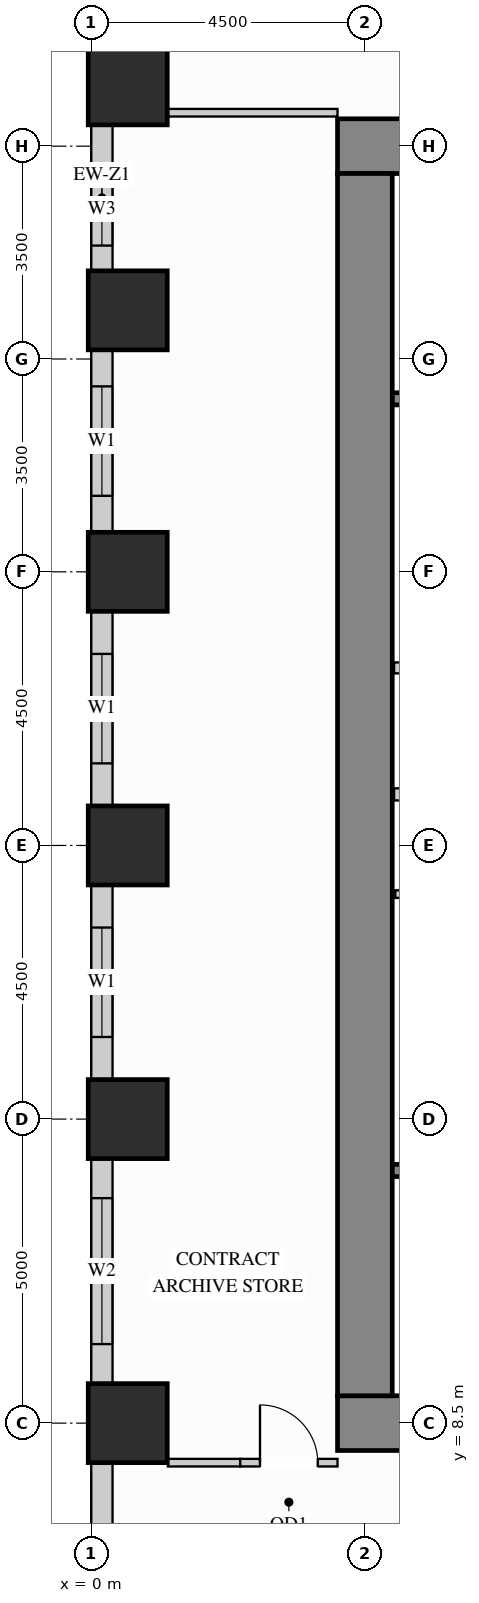
"""IFC4 building model, lengths in metres.
Left out: names, types, materials, properties, quantities, classifications, styles, units other than length and angle.
Written with IfcOpenShell. Run it as: python <this file> out.ifc"""

import sys

from ifc_helpers import new_model, si_unit, direction, frame, frame_2d, origin, origin_2d, place, context, subcontext, project, spatial, rectangle, extrude, source, transform, mapped, element, fill, save


model = new_model("IFC4")
c1 = context("Model", 3, precision=1e-05, world=origin(), true_north=direction((0.0, 1.0)))
c2 = subcontext(c1, "Body", "Model", "MODEL_VIEW")
j1 = project(units=[si_unit("LENGTHUNIT", "METRE"), si_unit("PLANEANGLEUNIT", "RADIAN")], contexts=[c1])
p1 = place(None, origin())
s1 = spatial("IfcSite", under=j1, at=p1, CompositionType="ELEMENT")
p2 = place(p1, origin())
s2 = spatial("IfcBuilding", under=s1, at=p2, CompositionType="ELEMENT")
p3 = place(p2, frame((0.0, 0.0, 40.5)))
s3 = spatial("IfcBuildingStorey", under=s2, at=p3, CompositionType="ELEMENT", Elevation=40.5)
m1 = source(origin(), c2, "Body", "SweptSolid", [
    extrude(rectangle(XDim=1.3, YDim=1.3, at=origin_2d()), origin(), (0.0, 0.0, 1.0), 3.38),
])
for number, where, z_axis, x_axis in (
    (1, (0.6, 13.5, 0.0), (0.0, 0.0, 1.0), (1.0, 0.0, 0.0)),
    (2, (0.6, 18.0, 0.0), (0.0, 0.0, 1.0), (1.0, 0.0, 0.0)),
    (3, (0.6, 22.5, 0.0), (0.0, 0.0, 1.0), (1.0, 0.0, 0.0)),
    (4, (0.6, 26.8, 0.0), (0.0, 0.0, 1.0), (1.0, 0.0, 0.0)),
    (5, (0.6, 30.5, 0.0), (0.0, 0.0, 1.0), (1.0, 0.0, 0.0)),
    (6, (0.6, 8.5, 0.0), (0.0, 0.0, 1.0), (1.0, 0.0, 0.0)),
):
    element("IfcColumn", number, at=place(p3, frame(where, z_axis=z_axis, x_axis=x_axis)), inside=s3, PredefinedType="COLUMN", context=c2, shape_type="MappedRepresentation", body=[
        mapped(m1, transform((0.0, 0.0, 0.0), x_axis=(1.0, 0.0, 0.0), y_axis=(0.0, 1.0, 0.0), z_axis=(0.0, 0.0, 1.0))),
    ])
m2 = source(origin(), c2, "Body", "SweptSolid", [
    extrude(rectangle(XDim=10.9, YDim=0.9, at=frame_2d((5.45, 0.0))), origin(), (0.0, 0.0, 1.0), 3.38),
])
for number, where, z_axis, x_axis in (
    (7, (4.05, 29.5, 0.0), (0.0, 0.0, 1.0), (1.0, 0.0, 0.0)),
    (8, (4.05, 8.5, 0.0), (0.0, 0.0, 1.0), (1.0, 0.0, 0.0)),
):
    element("IfcWall", number, at=place(p3, frame(where, z_axis=z_axis, x_axis=x_axis)), inside=s3, PredefinedType="SHEAR", context=c2, shape_type="MappedRepresentation", body=[
        mapped(m2, transform((0.0, 0.0, 0.0), x_axis=(1.0, 0.0, 0.0), y_axis=(0.0, 1.0, 0.0), z_axis=(0.0, 0.0, 1.0))),
    ])
m3 = source(origin(), c2, "Body", "SweptSolid", [
    extrude(rectangle(XDim=20.1, YDim=0.9, at=frame_2d((10.05, 0.0))), origin(), (0.0, 0.0, 1.0), 3.38),
])
p4 = place(p3, frame((4.5, 8.95, 0.0), z_axis=(0.0, 0.0, 1.0), x_axis=(0.0, 1.0, 0.0)))
e9 = element("IfcWall", 9, at=p4, inside=s3, PredefinedType="SHEAR", context=c2, shape_type="MappedRepresentation", body=[
    mapped(m3, transform((0.0, 0.0, 0.0), x_axis=(1.0, 0.0, 0.0), y_axis=(0.0, 1.0, 0.0), z_axis=(0.0, 0.0, 1.0))),
])
p5 = place(p3, frame((0.175, 29.852, 0.0), z_axis=(0.0, 0.0, 1.0), x_axis=(0.0, -1.0, 0.0)))
e10 = element("IfcWall", 10, at=p5, inside=s3, PredefinedType="SOLIDWALL", context=c2, shape_type="SweptSolid", body=[
    extrude(rectangle(XDim=2.404, YDim=0.35, at=frame_2d((1.202, 0.0))), origin(), (0.0, 0.0, 1.0), 2.51),
])
p6 = place(p5, frame((0.787, 0.0, 0.78)))
e11 = element("IfcOpeningElement", 11, at=p6, cuts=e10, PredefinedType="OPENING", context=c2, shape_type="SweptSolid", body=[
    extrude(rectangle(XDim=1.2, YDim=1.55, at=frame_2d((0.6, 0.775))), frame((0.0, 0.185, 0.0), z_axis=(0.0, -1.0, 0.0), x_axis=(1.0, 0.0, 0.0)), (0.0, 0.0, 1.0), 0.37),
])
p7 = place(p3, frame((0.175, 26.152, 0.0), z_axis=(0.0, 0.0, 1.0), x_axis=(0.0, -1.0, 0.0)))
e12 = element("IfcWall", 12, at=p7, inside=s3, PredefinedType="SOLIDWALL", context=c2, shape_type="SweptSolid", body=[
    extrude(rectangle(XDim=3.004, YDim=0.35, at=frame_2d((1.502, 0.0))), origin(), (0.0, 0.0, 1.0), 2.51),
])
p8 = place(p7, frame((0.602, 0.0, 0.78)))
e13 = element("IfcOpeningElement", 13, at=p8, cuts=e12, PredefinedType="OPENING", context=c2, shape_type="SweptSolid", body=[
    extrude(rectangle(XDim=1.8, YDim=1.55, at=frame_2d((0.9, 0.775))), frame((0.0, 0.185, 0.0), z_axis=(0.0, -1.0, 0.0), x_axis=(1.0, 0.0, 0.0)), (0.0, 0.0, 1.0), 0.37),
])
p9 = place(p3, frame((0.175, 21.852, 0.0), z_axis=(0.0, 0.0, 1.0), x_axis=(0.0, -1.0, 0.0)))
e14 = element("IfcWall", 14, at=p9, inside=s3, PredefinedType="SOLIDWALL", context=c2, shape_type="SweptSolid", body=[
    extrude(rectangle(XDim=3.204, YDim=0.35, at=frame_2d((1.602, 0.0))), origin(), (0.0, 0.0, 1.0), 2.51),
])
p10 = place(p9, frame((0.702, 0.0, 0.78)))
e15 = element("IfcOpeningElement", 15, at=p10, cuts=e14, PredefinedType="OPENING", context=c2, shape_type="SweptSolid", body=[
    extrude(rectangle(XDim=1.8, YDim=1.55, at=frame_2d((0.9, 0.775))), frame((0.0, 0.185, 0.0), z_axis=(0.0, -1.0, 0.0), x_axis=(1.0, 0.0, 0.0)), (0.0, 0.0, 1.0), 0.37),
])
p11 = place(p3, frame((0.175, 17.352, 0.0), z_axis=(0.0, 0.0, 1.0), x_axis=(0.0, -1.0, 0.0)))
e16 = element("IfcWall", 16, at=p11, inside=s3, PredefinedType="SOLIDWALL", context=c2, shape_type="SweptSolid", body=[
    extrude(rectangle(XDim=3.204, YDim=0.35, at=frame_2d((1.602, 0.0))), origin(), (0.0, 0.0, 1.0), 2.51),
])
p12 = place(p11, frame((0.702, 0.0, 0.78)))
e17 = element("IfcOpeningElement", 17, at=p12, cuts=e16, PredefinedType="OPENING", context=c2, shape_type="SweptSolid", body=[
    extrude(rectangle(XDim=1.8, YDim=1.55, at=frame_2d((0.9, 0.775))), frame((0.0, 0.185, 0.0), z_axis=(0.0, -1.0, 0.0), x_axis=(1.0, 0.0, 0.0)), (0.0, 0.0, 1.0), 0.37),
])
p13 = place(p3, frame((0.175, 12.852, 0.0), z_axis=(0.0, 0.0, 1.0), x_axis=(0.0, -1.0, 0.0)))
e18 = element("IfcWall", 18, at=p13, inside=s3, PredefinedType="SOLIDWALL", context=c2, shape_type="SweptSolid", body=[
    extrude(rectangle(XDim=3.704, YDim=0.35, at=frame_2d((1.852, 0.0))), origin(), (0.0, 0.0, 1.0), 2.51),
])
p14 = place(p13, frame((0.652, 0.0, 0.78)))
e19 = element("IfcOpeningElement", 19, at=p14, cuts=e18, PredefinedType="OPENING", context=c2, shape_type="SweptSolid", body=[
    extrude(rectangle(XDim=2.4, YDim=1.55, at=frame_2d((1.2, 0.775))), frame((0.0, 0.185, 0.0), z_axis=(0.0, -1.0, 0.0), x_axis=(1.0, 0.0, 0.0)), (0.0, 0.0, 1.0), 0.37),
])
p15 = place(p3, frame((0.175, 7.852, 0.0), z_axis=(0.0, 0.0, 1.0), x_axis=(0.0, -1.0, 0.0)))
e20 = element("IfcWall", 20, at=p15, inside=s3, PredefinedType="SOLIDWALL", context=c2, shape_type="SweptSolid", body=[
    extrude(rectangle(XDim=3.704, YDim=0.35, at=frame_2d((1.852, 0.0))), origin(), (0.0, 0.0, 1.0), 2.51),
])
p16 = place(p15, frame((2.068, 0.0, 0.78)))
e21 = element("IfcOpeningElement", 21, at=p16, cuts=e20, PredefinedType="OPENING", context=c2, shape_type="SweptSolid", body=[
    extrude(rectangle(XDim=1.2, YDim=1.55, at=frame_2d((0.6, 0.775))), frame((0.0, 0.185, 0.0), z_axis=(0.0, -1.0, 0.0), x_axis=(1.0, 0.0, 0.0)), (0.0, 0.0, 1.0), 0.37),
])
m4 = source(origin(), c2, "Body", "SweptSolid", [
    extrude(rectangle(XDim=2.17, YDim=0.18, at=frame_2d((1.085, 0.0))), origin(), (0.0, 0.0, 1.0), 3.365),
])
p17 = place(p3, frame((4.98, 20.92, 0.0), z_axis=(0.0, 0.0, 1.0), x_axis=(1.0, 0.0, 0.0)))
e22 = element("IfcWall", 22, at=p17, inside=s3, PredefinedType="PARTITIONING", context=c2, shape_type="MappedRepresentation", body=[
    mapped(m4, transform((0.0, 0.0, 0.0), x_axis=(1.0, 0.0, 0.0), y_axis=(0.0, 1.0, 0.0), z_axis=(0.0, 0.0, 1.0))),
])
p18 = place(p3, frame((5.0, 17.2, 0.0), z_axis=(0.0, 0.0, 1.0), x_axis=(1.0, 0.0, 0.0)))
e23 = element("IfcWall", 23, at=p18, inside=s3, PredefinedType="PARTITIONING", context=c2, shape_type="SweptSolid", body=[
    extrude(rectangle(XDim=2.4, YDim=0.125, at=frame_2d((1.2, 0.0))), origin(), (0.0, 0.0, 1.0), 3.365),
])
p19 = place(p18, frame((0.7, 0.0, 0.0)))
e24 = element("IfcOpeningElement", 24, at=p19, cuts=e23, PredefinedType="OPENING", context=c2, shape_type="SweptSolid", body=[
    extrude(rectangle(XDim=0.85, YDim=2.1, at=frame_2d((0.425, 1.05))), frame((0.0, 0.073, 0.0), z_axis=(0.0, -1.0, 0.0), x_axis=(1.0, 0.0, 0.0)), (0.0, 0.0, 1.0), 0.145),
])
m5 = source(origin(), c2, "Body", "SweptSolid", [
    extrude(rectangle(XDim=2.79, YDim=0.125, at=frame_2d((1.395, 0.0))), origin(), (0.0, 0.0, 1.0), 3.365),
])
p20 = place(p3, frame((1.26, 30.05, 0.0), z_axis=(0.0, 0.0, 1.0), x_axis=(1.0, 0.0, 0.0)))
e25 = element("IfcWall", 25, at=p20, inside=s3, PredefinedType="PARTITIONING", context=c2, shape_type="MappedRepresentation", body=[
    mapped(m5, transform((0.0, 0.0, 0.0), x_axis=(1.0, 0.0, 0.0), y_axis=(0.0, 1.0, 0.0), z_axis=(0.0, 0.0, 1.0))),
])
m6 = source(origin(), c2, "Body", "SweptSolid", [
    extrude(rectangle(XDim=1.19, YDim=0.125, at=frame_2d((0.595, 0.0))), origin(), (0.0, 0.0, 1.0), 3.365),
])
p21 = place(p3, frame((1.26, 7.85, 0.0), z_axis=(0.0, 0.0, 1.0), x_axis=(1.0, 0.0, 0.0)))
e26 = element("IfcWall", 26, at=p21, inside=s3, PredefinedType="PARTITIONING", context=c2, shape_type="MappedRepresentation", body=[
    mapped(m6, transform((0.0, 0.0, 0.0), x_axis=(1.0, 0.0, 0.0), y_axis=(0.0, 1.0, 0.0), z_axis=(0.0, 0.0, 1.0))),
])
p22 = place(p3, frame((2.45, 7.85, 0.0), z_axis=(0.0, 0.0, 1.0), x_axis=(1.0, 0.0, 0.0)))
e27 = element("IfcWall", 27, at=p22, inside=s3, PredefinedType="PARTITIONING", context=c2, shape_type="SweptSolid", body=[
    extrude(rectangle(XDim=1.6, YDim=0.125, at=frame_2d((0.8, 0.0))), origin(), (0.0, 0.0, 1.0), 3.365),
])
p23 = place(p22, frame((0.325, 0.0, 0.0)))
e28 = element("IfcOpeningElement", 28, at=p23, cuts=e27, PredefinedType="OPENING", context=c2, shape_type="SweptSolid", body=[
    extrude(rectangle(XDim=0.95, YDim=2.15, at=frame_2d((0.475, 1.075))), frame((0.0, 0.073, 0.0), z_axis=(0.0, -1.0, 0.0), x_axis=(1.0, 0.0, 0.0)), (0.0, 0.0, 1.0), 0.145),
])
m7 = source(origin(), c2, "Body", "SweptSolid", [
    extrude(rectangle(XDim=2.09, YDim=0.2, at=frame_2d((1.045, 0.0))), origin(), (0.0, 0.0, 1.0), 3.365),
])
p24 = place(p3, frame((4.98, 18.84, 0.0), z_axis=(0.0, 0.0, 1.0), x_axis=(1.0, 0.0, 0.0)))
e29 = element("IfcWall", 29, at=p24, inside=s3, PredefinedType="PARTITIONING", context=c2, shape_type="MappedRepresentation", body=[
    mapped(m7, transform((0.0, 0.0, 0.0), x_axis=(1.0, 0.0, 0.0), y_axis=(0.0, 1.0, 0.0), z_axis=(0.0, 0.0, 1.0))),
])
p25 = place(p3, frame((4.952, 12.655, 0.0), z_axis=(0.0, 0.0, 1.0), x_axis=(1.0, 0.0, 0.0)))
e30 = element("IfcWall", 30, at=p25, inside=s3, PredefinedType="SHEAR", context=c2, shape_type="SweptSolid", body=[
    extrude(rectangle(XDim=7.453, YDim=0.2, at=frame_2d((3.727, 0.0))), origin(), (0.0, 0.0, 1.0), 3.38),
])
p26 = place(p25, frame((0.4, 0.0, 0.0)))
e31 = element("IfcOpeningElement", 31, at=p26, cuts=e30, PredefinedType="OPENING", context=c2, shape_type="SweptSolid", body=[
    extrude(rectangle(XDim=1.1, YDim=2.15, at=frame_2d((0.55, 1.075))), frame((0.0, 0.11, 0.0), z_axis=(0.0, -1.0, 0.0), x_axis=(1.0, 0.0, 0.0)), (0.0, 0.0, 1.0), 0.22),
])
p27 = place(p3, frame((4.952, 25.345, 0.0), z_axis=(0.0, 0.0, 1.0), x_axis=(1.0, 0.0, 0.0)))
e32 = element("IfcWall", 32, at=p27, inside=s3, PredefinedType="SHEAR", context=c2, shape_type="SweptSolid", body=[
    extrude(rectangle(XDim=7.453, YDim=0.2, at=frame_2d((3.727, 0.0))), origin(), (0.0, 0.0, 1.0), 3.38),
])
p28 = place(p27, frame((0.4, 0.0, 0.0)))
e33 = element("IfcOpeningElement", 33, at=p28, cuts=e32, PredefinedType="OPENING", context=c2, shape_type="SweptSolid", body=[
    extrude(rectangle(XDim=1.1, YDim=2.15, at=frame_2d((0.55, 1.075))), frame((0.0, 0.11, 0.0), z_axis=(0.0, -1.0, 0.0), x_axis=(1.0, 0.0, 0.0)), (0.0, 0.0, 1.0), 0.22),
])
m8 = source(origin(), c2, "Body", "SweptSolid", [
    extrude(rectangle(XDim=0.95, YDim=2.15, at=frame_2d((0.475, 1.075))), frame((0.0, 0.025, 0.0), z_axis=(0.0, -1.0, 0.0), x_axis=(1.0, 0.0, 0.0)), (0.0, 0.0, 1.0), 0.05),
])
p29 = place(p23, origin())
e34 = element("IfcDoor", 34, at=p29, inside=s3, OperationType="SINGLE_SWING_LEFT", PredefinedType="DOOR", context=c2, shape_type="MappedRepresentation", body=[
    mapped(m8, transform((0.0, 0.0, 0.0), x_axis=(1.0, 0.0, 0.0), y_axis=(0.0, 1.0, 0.0), z_axis=(0.0, 0.0, 1.0))),
])
fill(e28, e34)
m9 = source(origin(), c2, "Body", "SweptSolid", [
    extrude(rectangle(XDim=1.8, YDim=1.55, at=frame_2d((0.9, 0.775))), frame((0.0, 0.03, 0.0), z_axis=(0.0, -1.0, 0.0), x_axis=(1.0, 0.0, 0.0)), (0.0, 0.0, 1.0), 0.06),
])
p30 = place(p8, origin())
e35 = element("IfcWindow", 35, at=p30, inside=s3, PartitioningType="SINGLE_PANEL", PredefinedType="WINDOW", context=c2, shape_type="MappedRepresentation", body=[
    mapped(m9, transform((0.0, 0.0, 0.0), x_axis=(1.0, 0.0, 0.0), y_axis=(0.0, 1.0, 0.0), z_axis=(0.0, 0.0, 1.0))),
])
fill(e13, e35)
p31 = place(p10, origin())
e36 = element("IfcWindow", 36, at=p31, inside=s3, PartitioningType="SINGLE_PANEL", PredefinedType="WINDOW", context=c2, shape_type="MappedRepresentation", body=[
    mapped(m9, transform((0.0, 0.0, 0.0), x_axis=(1.0, 0.0, 0.0), y_axis=(0.0, 1.0, 0.0), z_axis=(0.0, 0.0, 1.0))),
])
fill(e15, e36)
p32 = place(p12, origin())
e37 = element("IfcWindow", 37, at=p32, inside=s3, PartitioningType="SINGLE_PANEL", PredefinedType="WINDOW", context=c2, shape_type="MappedRepresentation", body=[
    mapped(m9, transform((0.0, 0.0, 0.0), x_axis=(1.0, 0.0, 0.0), y_axis=(0.0, 1.0, 0.0), z_axis=(0.0, 0.0, 1.0))),
])
fill(e17, e37)
m10 = source(origin(), c2, "Body", "SweptSolid", [
    extrude(rectangle(XDim=2.4, YDim=1.55, at=frame_2d((1.2, 0.775))), frame((0.0, 0.03, 0.0), z_axis=(0.0, -1.0, 0.0), x_axis=(1.0, 0.0, 0.0)), (0.0, 0.0, 1.0), 0.06),
])
p33 = place(p14, origin())
e38 = element("IfcWindow", 38, at=p33, inside=s3, PartitioningType="SINGLE_PANEL", PredefinedType="WINDOW", context=c2, shape_type="MappedRepresentation", body=[
    mapped(m10, transform((0.0, 0.0, 0.0), x_axis=(1.0, 0.0, 0.0), y_axis=(0.0, 1.0, 0.0), z_axis=(0.0, 0.0, 1.0))),
])
fill(e19, e38)
m11 = source(origin(), c2, "Body", "SweptSolid", [
    extrude(rectangle(XDim=1.2, YDim=1.55, at=frame_2d((0.6, 0.775))), frame((0.0, 0.03, 0.0), z_axis=(0.0, -1.0, 0.0), x_axis=(1.0, 0.0, 0.0)), (0.0, 0.0, 1.0), 0.06),
])
p34 = place(p6, origin())
e39 = element("IfcWindow", 39, at=p34, inside=s3, PartitioningType="SINGLE_PANEL", PredefinedType="WINDOW", context=c2, shape_type="MappedRepresentation", body=[
    mapped(m11, transform((0.0, 0.0, 0.0), x_axis=(1.0, 0.0, 0.0), y_axis=(0.0, 1.0, 0.0), z_axis=(0.0, 0.0, 1.0))),
])
fill(e11, e39)
save(model, sys.argv[1])
